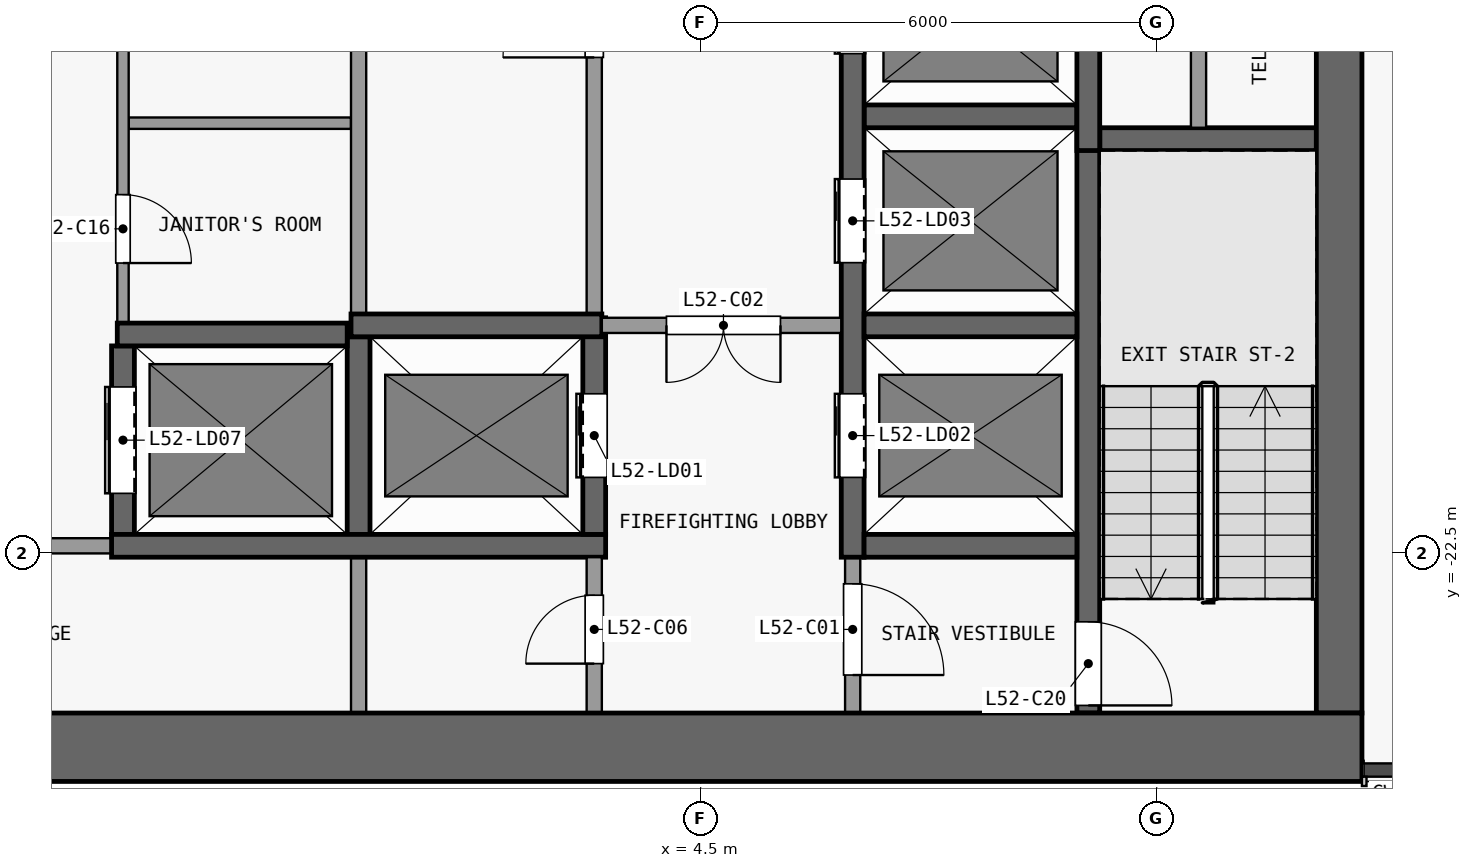
"""IFC4 building model, lengths in metres.
Left out: names, types, materials, properties, quantities, classifications, styles, units other than length and angle.
Written with IfcOpenShell. Run it as: python <this file> out.ifc"""

import sys

from ifc_helpers import new_model, si_unit, direction, frame, frame_2d, origin, place, context, subcontext, project, spatial, rectangle, extrude, element, fill, save


model = new_model("IFC4")
c1 = context("Model", 3, precision=1e-05, world=origin(), true_north=direction((0.0, 1.0)))
c2 = subcontext(c1, "Body", "Model", "MODEL_VIEW")
j1 = project(units=[si_unit("LENGTHUNIT", "METRE"), si_unit("PLANEANGLEUNIT", "RADIAN")], contexts=[c1])
p1 = place(None, origin())
s1 = spatial("IfcSite", under=j1, at=p1, CompositionType="ELEMENT")
p2 = place(p1, origin())
s2 = spatial("IfcBuilding", under=s1, at=p2, CompositionType="ELEMENT")
p3 = place(p2, frame((0.0, 0.0, 208.7)))
s3 = spatial("IfcBuildingStorey", under=s2, at=p3, CompositionType="ELEMENT", Elevation=208.7)
p4 = place(p3, frame((-13.2, -25.05, 0.0), z_axis=(0.0, 0.0, 1.0), x_axis=(1.0, 0.0, 0.0)))
e1 = element("IfcWall", 1, at=p4, inside=s3, PredefinedType="SHEAR", context=c2, shape_type="SweptSolid", body=[
    extrude(rectangle(XDim=26.4, YDim=0.9, at=frame_2d((13.2, 0.0))), origin(), (0.0, 0.0, 1.0), 3.3),
])
p5 = place(p3, frame((12.9, -24.6, 0.0), z_axis=(0.0, 0.0, 1.0), x_axis=(0.0, 1.0, 0.0)))
e2 = element("IfcWall", 2, at=p5, inside=s3, PredefinedType="SHEAR", context=c2, shape_type="SweptSolid", body=[
    extrude(rectangle(XDim=16.1, YDim=0.6, at=frame_2d((8.05, 0.0))), origin(), (0.0, 0.0, 1.0), 3.3),
])
p6 = place(p3, frame((-3.25, -22.4, 0.0), z_axis=(0.0, 0.0, 1.0), x_axis=(-1.0, 0.0, 0.0)))
e3 = element("IfcWall", 3, at=p6, inside=s3, PredefinedType="PARTITIONING", context=c2, shape_type="SweptSolid", body=[
    extrude(rectangle(XDim=3.15, YDim=0.2, at=frame_2d((1.575, 0.0))), origin(), (0.0, 0.0, 1.0), 3.3),
])
p7 = place(p6, frame((0.8, 0.0, 0.0)))
e4 = element("IfcOpeningElement", 4, at=p7, cuts=e3, PredefinedType="OPENING", context=c2, shape_type="SweptSolid", body=[
    extrude(rectangle(XDim=1.5, YDim=2.1, at=frame_2d((0.75, 1.05))), frame((0.0, 0.11, 0.0), z_axis=(0.0, -1.0, 0.0), x_axis=(1.0, 0.0, 0.0)), (0.0, 0.0, 1.0), 0.22),
])
p8 = place(p3, frame((-3.25, -22.4, 0.0), z_axis=(0.0, 0.0, 1.0), x_axis=(1.0, 0.0, 0.0)))
e5 = element("IfcWall", 5, at=p8, inside=s3, PredefinedType="SHEAR", context=c2, shape_type="SweptSolid", body=[
    extrude(rectangle(XDim=6.5, YDim=0.3, at=frame_2d((3.25, 0.0))), origin(), (0.0, 0.0, 1.0), 3.3),
])
p9 = place(p3, frame((6.65, -22.4, 0.0), z_axis=(0.0, 0.0, 1.0), x_axis=(1.0, 0.0, 0.0)))
e6 = element("IfcWall", 6, at=p9, inside=s3, PredefinedType="SHEAR", context=c2, shape_type="SweptSolid", body=[
    extrude(rectangle(XDim=2.8, YDim=0.3, at=frame_2d((1.4, 0.0))), origin(), (0.0, 0.0, 1.0), 3.3),
])
p10 = place(p3, frame((-3.175, -19.62, 0.0), z_axis=(0.0, 0.0, 1.0), x_axis=(1.0, 0.0, 0.0)))
e7 = element("IfcWall", 7, at=p10, inside=s3, PredefinedType="SHEAR", context=c2, shape_type="SweptSolid", body=[
    extrude(rectangle(XDim=3.025, YDim=0.3, at=frame_2d((1.513, 0.0))), origin(), (0.0, 0.0, 1.0), 3.3),
])
p11 = place(p3, frame((-0.1, -19.5, 0.0), z_axis=(0.0, 0.0, 1.0), x_axis=(1.0, 0.0, 0.0)))
e8 = element("IfcWall", 8, at=p11, inside=s3, PredefinedType="SHEAR", context=c2, shape_type="SweptSolid", body=[
    extrude(rectangle(XDim=3.3, YDim=0.3, at=frame_2d((1.65, 0.0))), origin(), (0.0, 0.0, 1.0), 3.3),
])
p12 = place(p3, frame((6.35, -19.5, 0.0), z_axis=(0.0, 0.0, 1.0), x_axis=(-1.0, 0.0, 0.0)))
e9 = element("IfcWall", 9, at=p12, inside=s3, PredefinedType="PARTITIONING", context=c2, shape_type="SweptSolid", body=[
    extrude(rectangle(XDim=3.15, YDim=0.2, at=frame_2d((1.575, 0.0))), origin(), (0.0, 0.0, 1.0), 3.3),
])
p13 = place(p12, frame((0.8, 0.0, 0.0)))
e10 = element("IfcOpeningElement", 10, at=p13, cuts=e9, PredefinedType="OPENING", context=c2, shape_type="SweptSolid", body=[
    extrude(rectangle(XDim=1.5, YDim=2.1, at=frame_2d((0.75, 1.05))), frame((0.0, 0.11, 0.0), z_axis=(0.0, -1.0, 0.0), x_axis=(1.0, 0.0, 0.0)), (0.0, 0.0, 1.0), 0.22),
])
p14 = place(p3, frame((6.65, -19.5, 0.0), z_axis=(0.0, 0.0, 1.0), x_axis=(1.0, 0.0, 0.0)))
e11 = element("IfcWall", 11, at=p14, inside=s3, PredefinedType="SHEAR", context=c2, shape_type="SweptSolid", body=[
    extrude(rectangle(XDim=2.8, YDim=0.3, at=frame_2d((1.4, 0.0))), origin(), (0.0, 0.0, 1.0), 3.3),
])
p15 = place(p3, frame((9.75, -17.05, 0.0), z_axis=(0.0, 0.0, 1.0), x_axis=(1.0, 0.0, 0.0)))
e12 = element("IfcWall", 12, at=p15, inside=s3, PredefinedType="SHEAR", context=c2, shape_type="SweptSolid", body=[
    extrude(rectangle(XDim=2.85, YDim=0.3, at=frame_2d((1.425, 0.0))), origin(), (0.0, 0.0, 1.0), 3.3),
])
p16 = place(p3, frame((-3.025, -16.84, 0.0), z_axis=(0.0, 0.0, 1.0), x_axis=(1.0, 0.0, 0.0)))
e13 = element("IfcWall", 13, at=p16, inside=s3, PredefinedType="PARTITIONING", context=c2, shape_type="SweptSolid", body=[
    extrude(rectangle(XDim=2.925, YDim=0.15, at=frame_2d((1.462, 0.0))), origin(), (0.0, 0.0, 1.0), 3.3),
])
p17 = place(p3, frame((6.65, -16.75, 0.0), z_axis=(0.0, 0.0, 1.0), x_axis=(1.0, 0.0, 0.0)))
e14 = element("IfcWall", 14, at=p17, inside=s3, PredefinedType="SHEAR", context=c2, shape_type="SweptSolid", body=[
    extrude(rectangle(XDim=2.8, YDim=0.3, at=frame_2d((1.4, 0.0))), origin(), (0.0, 0.0, 1.0), 3.3),
])
p18 = place(p3, frame((-3.1, -22.25, 0.0), z_axis=(0.0, 0.0, 1.0), x_axis=(0.0, 1.0, 0.0)))
e15 = element("IfcWall", 15, at=p18, inside=s3, PredefinedType="SHEAR", context=c2, shape_type="SweptSolid", body=[
    extrude(rectangle(XDim=2.48, YDim=0.3, at=frame_2d((1.24, 0.0))), origin(), (0.0, 0.0, 1.0), 3.3),
])
p19 = place(p18, frame((0.54, 0.0, 0.0)))
e16 = element("IfcOpeningElement", 16, at=p19, cuts=e15, PredefinedType="OPENING", context=c2, shape_type="SweptSolid", body=[
    extrude(rectangle(XDim=1.4, YDim=2.1, at=frame_2d((0.7, 1.05))), frame((0.0, 0.16, 0.0), z_axis=(0.0, -1.0, 0.0), x_axis=(1.0, 0.0, 0.0)), (0.0, 0.0, 1.0), 0.32),
])
p20 = place(p3, frame((-3.1, -8.5, 0.0), z_axis=(0.0, 0.0, 1.0), x_axis=(0.0, -1.0, 0.0)))
e17 = element("IfcWall", 17, at=p20, inside=s3, PredefinedType="PARTITIONING", context=c2, shape_type="SweptSolid", body=[
    extrude(rectangle(XDim=10.97, YDim=0.15, at=frame_2d((5.485, 0.0))), origin(), (0.0, 0.0, 1.0), 3.3),
])
p21 = place(p20, frame((9.28, 0.0, 0.0)))
e18 = element("IfcOpeningElement", 18, at=p21, cuts=e17, PredefinedType="OPENING", context=c2, shape_type="SweptSolid", body=[
    extrude(rectangle(XDim=0.9, YDim=2.1, at=frame_2d((0.45, 1.05))), frame((0.0, 0.085, 0.0), z_axis=(0.0, -1.0, 0.0), x_axis=(1.0, 0.0, 0.0)), (0.0, 0.0, 1.0), 0.17),
])
p22 = place(p20, frame((3.57, 0.0, 0.0)))
e19 = element("IfcOpeningElement", 19, at=p22, cuts=e17, PredefinedType="OPENING", context=c2, shape_type="SweptSolid", body=[
    extrude(rectangle(XDim=1.2, YDim=2.1, at=frame_2d((0.6, 1.05))), frame((0.0, 0.085, 0.0), z_axis=(0.0, -1.0, 0.0), x_axis=(1.0, 0.0, 0.0)), (0.0, 0.0, 1.0), 0.17),
])
p23 = place(p3, frame((0.0, -24.6, 0.0), z_axis=(0.0, 0.0, 1.0), x_axis=(0.0, 1.0, 0.0)))
e20 = element("IfcWall", 20, at=p23, inside=s3, PredefinedType="PARTITIONING", context=c2, shape_type="SweptSolid", body=[
    extrude(rectangle(XDim=2.05, YDim=0.2, at=frame_2d((1.025, 0.0))), origin(), (0.0, 0.0, 1.0), 3.3),
])
p24 = place(p3, frame((0.0, -22.25, 0.0), z_axis=(0.0, 0.0, 1.0), x_axis=(0.0, 1.0, 0.0)))
e21 = element("IfcWall", 21, at=p24, inside=s3, PredefinedType="SHEAR", context=c2, shape_type="SweptSolid", body=[
    extrude(rectangle(XDim=2.6, YDim=0.3, at=frame_2d((1.3, 0.0))), origin(), (0.0, 0.0, 1.0), 3.3),
])
p25 = place(p3, frame((0.0, -19.35, 0.0), z_axis=(0.0, 0.0, 1.0), x_axis=(0.0, 1.0, 0.0)))
e22 = element("IfcWall", 22, at=p25, inside=s3, PredefinedType="PARTITIONING", context=c2, shape_type="SweptSolid", body=[
    extrude(rectangle(XDim=8.2, YDim=0.2, at=frame_2d((4.1, 0.0))), origin(), (0.0, 0.0, 1.0), 3.3),
])
p26 = place(p3, frame((3.1, -24.6, 0.0), z_axis=(0.0, 0.0, 1.0), x_axis=(0.0, 1.0, 0.0)))
e23 = element("IfcWall", 23, at=p26, inside=s3, PredefinedType="PARTITIONING", context=c2, shape_type="SweptSolid", body=[
    extrude(rectangle(XDim=2.05, YDim=0.2, at=frame_2d((1.025, 0.0))), origin(), (0.0, 0.0, 1.0), 3.3),
])
p27 = place(p26, frame((0.65, 0.0, 0.0)))
e24 = element("IfcOpeningElement", 24, at=p27, cuts=e23, PredefinedType="OPENING", context=c2, shape_type="SweptSolid", body=[
    extrude(rectangle(XDim=0.9, YDim=2.1, at=frame_2d((0.45, 1.05))), frame((0.0, 0.11, 0.0), z_axis=(0.0, -1.0, 0.0), x_axis=(1.0, 0.0, 0.0)), (0.0, 0.0, 1.0), 0.22),
])
p28 = place(p3, frame((3.1, -22.25, 0.0), z_axis=(0.0, 0.0, 1.0), x_axis=(0.0, 1.0, 0.0)))
e25 = element("IfcWall", 25, at=p28, inside=s3, PredefinedType="SHEAR", context=c2, shape_type="SweptSolid", body=[
    extrude(rectangle(XDim=2.85, YDim=0.3, at=frame_2d((1.425, 0.0))), origin(), (0.0, 0.0, 1.0), 3.3),
])
p29 = place(p28, frame((0.75, 0.0, 0.0)))
e26 = element("IfcOpeningElement", 26, at=p29, cuts=e25, PredefinedType="OPENING", context=c2, shape_type="SweptSolid", body=[
    extrude(rectangle(XDim=1.1, YDim=2.1, at=frame_2d((0.55, 1.05))), frame((0.0, 0.16, 0.0), z_axis=(0.0, -1.0, 0.0), x_axis=(1.0, 0.0, 0.0)), (0.0, 0.0, 1.0), 0.32),
])
p30 = place(p3, frame((3.1, -19.6, 0.0), z_axis=(0.0, 0.0, 1.0), x_axis=(0.0, 1.0, 0.0)))
e27 = element("IfcWall", 27, at=p30, inside=s3, PredefinedType="PARTITIONING", context=c2, shape_type="SweptSolid", body=[
    extrude(rectangle(XDim=8.45, YDim=0.2, at=frame_2d((4.225, 0.0))), origin(), (0.0, 0.0, 1.0), 3.3),
])
p31 = place(p30, frame((3.625, 0.0, 0.0)))
e28 = element("IfcOpeningElement", 28, at=p31, cuts=e27, PredefinedType="OPENING", context=c2, shape_type="SweptSolid", body=[
    extrude(rectangle(XDim=1.2, YDim=2.1, at=frame_2d((0.6, 1.05))), frame((0.0, 0.11, 0.0), z_axis=(0.0, -1.0, 0.0), x_axis=(1.0, 0.0, 0.0)), (0.0, 0.0, 1.0), 0.22),
])
p32 = place(p3, frame((6.5, -22.55, 0.0), z_axis=(0.0, 0.0, 1.0), x_axis=(0.0, -1.0, 0.0)))
e29 = element("IfcWall", 29, at=p32, inside=s3, PredefinedType="PARTITIONING", context=c2, shape_type="SweptSolid", body=[
    extrude(rectangle(XDim=2.05, YDim=0.2, at=frame_2d((1.025, 0.0))), origin(), (0.0, 0.0, 1.0), 3.3),
])
p33 = place(p32, frame((0.35, 0.0, 0.0)))
e30 = element("IfcOpeningElement", 30, at=p33, cuts=e29, PredefinedType="OPENING", context=c2, shape_type="SweptSolid", body=[
    extrude(rectangle(XDim=1.2, YDim=2.1, at=frame_2d((0.6, 1.05))), frame((0.0, 0.11, 0.0), z_axis=(0.0, -1.0, 0.0), x_axis=(1.0, 0.0, 0.0)), (0.0, 0.0, 1.0), 0.22),
])
p34 = place(p3, frame((6.5, -22.55, 0.0), z_axis=(0.0, 0.0, 1.0), x_axis=(0.0, 1.0, 0.0)))
e31 = element("IfcWall", 31, at=p34, inside=s3, PredefinedType="SHEAR", context=c2, shape_type="SweptSolid", body=[
    extrude(rectangle(XDim=14.05, YDim=0.3, at=frame_2d((7.025, 0.0))), origin(), (0.0, 0.0, 1.0), 3.3),
])
p35 = place(p34, frame((1.05, 0.0, 0.0)))
e32 = element("IfcOpeningElement", 32, at=p35, cuts=e31, PredefinedType="OPENING", context=c2, shape_type="SweptSolid", body=[
    extrude(rectangle(XDim=1.1, YDim=2.1, at=frame_2d((0.55, 1.05))), frame((0.0, 0.16, 0.0), z_axis=(0.0, -1.0, 0.0), x_axis=(1.0, 0.0, 0.0)), (0.0, 0.0, 1.0), 0.32),
])
p36 = place(p34, frame((3.875, 0.0, 0.0)))
e33 = element("IfcOpeningElement", 33, at=p36, cuts=e31, PredefinedType="OPENING", context=c2, shape_type="SweptSolid", body=[
    extrude(rectangle(XDim=1.1, YDim=2.1, at=frame_2d((0.55, 1.05))), frame((0.0, 0.16, 0.0), z_axis=(0.0, -1.0, 0.0), x_axis=(1.0, 0.0, 0.0)), (0.0, 0.0, 1.0), 0.32),
])
p37 = place(p34, frame((6.625, 0.0, 0.0)))
e34 = element("IfcOpeningElement", 34, at=p37, cuts=e31, PredefinedType="OPENING", context=c2, shape_type="SweptSolid", body=[
    extrude(rectangle(XDim=1.1, YDim=2.1, at=frame_2d((0.55, 1.05))), frame((0.0, 0.16, 0.0), z_axis=(0.0, -1.0, 0.0), x_axis=(1.0, 0.0, 0.0)), (0.0, 0.0, 1.0), 0.32),
])
p38 = place(p34, frame((9.375, 0.0, 0.0)))
e35 = element("IfcOpeningElement", 35, at=p38, cuts=e31, PredefinedType="OPENING", context=c2, shape_type="SweptSolid", body=[
    extrude(rectangle(XDim=1.1, YDim=2.1, at=frame_2d((0.55, 1.05))), frame((0.0, 0.16, 0.0), z_axis=(0.0, -1.0, 0.0), x_axis=(1.0, 0.0, 0.0)), (0.0, 0.0, 1.0), 0.32),
])
p39 = place(p34, frame((12.125, 0.0, 0.0)))
e36 = element("IfcOpeningElement", 36, at=p39, cuts=e31, PredefinedType="OPENING", context=c2, shape_type="SweptSolid", body=[
    extrude(rectangle(XDim=1.1, YDim=2.1, at=frame_2d((0.55, 1.05))), frame((0.0, 0.16, 0.0), z_axis=(0.0, -1.0, 0.0), x_axis=(1.0, 0.0, 0.0)), (0.0, 0.0, 1.0), 0.32),
])
p40 = place(p3, frame((9.6, -16.9, 0.0), z_axis=(0.0, 0.0, 1.0), x_axis=(0.0, -1.0, 0.0)))
e37 = element("IfcWall", 37, at=p40, inside=s3, PredefinedType="SHEAR", context=c2, shape_type="SweptSolid", body=[
    extrude(rectangle(XDim=7.7, YDim=0.3, at=frame_2d((3.85, 0.0))), origin(), (0.0, 0.0, 1.0), 3.3),
])
p41 = place(p40, frame((6.5, 0.0, 0.0)))
e38 = element("IfcOpeningElement", 38, at=p41, cuts=e37, PredefinedType="OPENING", context=c2, shape_type="SweptSolid", body=[
    extrude(rectangle(XDim=1.1, YDim=2.1, at=frame_2d((0.55, 1.05))), frame((0.0, 0.16, 0.0), z_axis=(0.0, -1.0, 0.0), x_axis=(1.0, 0.0, 0.0)), (0.0, 0.0, 1.0), 0.32),
])
p42 = place(p3, frame((9.6, -17.2, 0.0), z_axis=(0.0, 0.0, 1.0), x_axis=(0.0, 1.0, 0.0)))
e39 = element("IfcWall", 39, at=p42, inside=s3, PredefinedType="SHEAR", context=c2, shape_type="SweptSolid", body=[
    extrude(rectangle(XDim=8.7, YDim=0.3, at=frame_2d((4.35, 0.0))), origin(), (0.0, 0.0, 1.0), 3.3),
])
p43 = place(p3, frame((11.05, -11.9, 0.0), z_axis=(0.0, 0.0, 1.0), x_axis=(0.0, -1.0, 0.0)))
e40 = element("IfcWall", 40, at=p43, inside=s3, PredefinedType="PARTITIONING", context=c2, shape_type="SweptSolid", body=[
    extrude(rectangle(XDim=5.0, YDim=0.2, at=frame_2d((2.5, 0.0))), origin(), (0.0, 0.0, 1.0), 3.3),
])
p44 = place(p43, frame((2.175, 0.0, 0.0)))
e41 = element("IfcOpeningElement", 41, at=p44, cuts=e40, PredefinedType="OPENING", context=c2, shape_type="SweptSolid", body=[
    extrude(rectangle(XDim=0.9, YDim=2.1, at=frame_2d((0.45, 1.05))), frame((0.0, 0.11, 0.0), z_axis=(0.0, -1.0, 0.0), x_axis=(1.0, 0.0, 0.0)), (0.0, 0.0, 1.0), 0.22),
])
p45 = place(p29, origin())
e42 = element("IfcDoor", 42, at=p45, inside=s3, OperationType="DOUBLE_DOOR_SLIDING", PredefinedType="DOOR", context=c2, shape_type="SweptSolid", body=[
    extrude(rectangle(XDim=1.1, YDim=2.1, at=frame_2d((0.55, 1.05))), frame((0.0, 0.025, 0.0), z_axis=(0.0, -1.0, 0.0), x_axis=(1.0, 0.0, 0.0)), (0.0, 0.0, 1.0), 0.05),
])
fill(e26, e42)
p46 = place(p35, origin())
e43 = element("IfcDoor", 43, at=p46, inside=s3, OperationType="DOUBLE_DOOR_SLIDING", PredefinedType="DOOR", context=c2, shape_type="SweptSolid", body=[
    extrude(rectangle(XDim=1.1, YDim=2.1, at=frame_2d((0.55, 1.05))), frame((0.0, 0.025, 0.0), z_axis=(0.0, -1.0, 0.0), x_axis=(1.0, 0.0, 0.0)), (0.0, 0.0, 1.0), 0.05),
])
fill(e32, e43)
p47 = place(p36, origin())
e44 = element("IfcDoor", 44, at=p47, inside=s3, OperationType="DOUBLE_DOOR_SLIDING", PredefinedType="DOOR", context=c2, shape_type="SweptSolid", body=[
    extrude(rectangle(XDim=1.1, YDim=2.1, at=frame_2d((0.55, 1.05))), frame((0.0, 0.025, 0.0), z_axis=(0.0, -1.0, 0.0), x_axis=(1.0, 0.0, 0.0)), (0.0, 0.0, 1.0), 0.05),
])
fill(e33, e44)
p48 = place(p37, origin())
e45 = element("IfcDoor", 45, at=p48, inside=s3, OperationType="DOUBLE_DOOR_SLIDING", PredefinedType="DOOR", context=c2, shape_type="SweptSolid", body=[
    extrude(rectangle(XDim=1.1, YDim=2.1, at=frame_2d((0.55, 1.05))), frame((0.0, 0.025, 0.0), z_axis=(0.0, -1.0, 0.0), x_axis=(1.0, 0.0, 0.0)), (0.0, 0.0, 1.0), 0.05),
])
fill(e34, e45)
p49 = place(p19, origin())
e46 = element("IfcDoor", 46, at=p49, inside=s3, OperationType="DOUBLE_DOOR_SLIDING", PredefinedType="DOOR", context=c2, shape_type="SweptSolid", body=[
    extrude(rectangle(XDim=1.4, YDim=2.1, at=frame_2d((0.7, 1.05))), frame((0.0, 0.025, 0.0), z_axis=(0.0, -1.0, 0.0), x_axis=(1.0, 0.0, 0.0)), (0.0, 0.0, 1.0), 0.05),
])
fill(e16, e46)
p50 = place(p33, origin())
e47 = element("IfcDoor", 47, at=p50, inside=s3, OperationType="SINGLE_SWING_RIGHT", PredefinedType="DOOR", context=c2, shape_type="SweptSolid", body=[
    extrude(rectangle(XDim=1.2, YDim=2.1, at=frame_2d((0.6, 1.05))), frame((0.0, 0.025, 0.0), z_axis=(0.0, -1.0, 0.0), x_axis=(1.0, 0.0, 0.0)), (0.0, 0.0, 1.0), 0.05),
])
fill(e30, e47)
p51 = place(p13, origin())
e48 = element("IfcDoor", 48, at=p51, inside=s3, OperationType="DOUBLE_DOOR_SINGLE_SWING", PredefinedType="DOOR", context=c2, shape_type="SweptSolid", body=[
    extrude(rectangle(XDim=1.5, YDim=2.1, at=frame_2d((0.75, 1.05))), frame((0.0, 0.025, 0.0), z_axis=(0.0, -1.0, 0.0), x_axis=(1.0, 0.0, 0.0)), (0.0, 0.0, 1.0), 0.05),
])
fill(e10, e48)
p52 = place(p27, origin())
e49 = element("IfcDoor", 49, at=p52, inside=s3, OperationType="SINGLE_SWING_LEFT", PredefinedType="DOOR", context=c2, shape_type="SweptSolid", body=[
    extrude(rectangle(XDim=0.9, YDim=2.1, at=frame_2d((0.45, 1.05))), frame((0.0, 0.025, 0.0), z_axis=(0.0, -1.0, 0.0), x_axis=(1.0, 0.0, 0.0)), (0.0, 0.0, 1.0), 0.05),
])
fill(e24, e49)
p53 = place(p31, origin())
e50 = element("IfcDoor", 50, at=p53, inside=s3, OperationType="SINGLE_SWING_LEFT", PredefinedType="DOOR", context=c2, shape_type="SweptSolid", body=[
    extrude(rectangle(XDim=1.2, YDim=2.1, at=frame_2d((0.6, 1.05))), frame((0.0, 0.025, 0.0), z_axis=(0.0, -1.0, 0.0), x_axis=(1.0, 0.0, 0.0)), (0.0, 0.0, 1.0), 0.05),
])
fill(e28, e50)
p54 = place(p21, origin())
e51 = element("IfcDoor", 51, at=p54, inside=s3, OperationType="SINGLE_SWING_RIGHT", PredefinedType="DOOR", context=c2, shape_type="SweptSolid", body=[
    extrude(rectangle(XDim=0.9, YDim=2.1, at=frame_2d((0.45, 1.05))), frame((0.0, 0.025, 0.0), z_axis=(0.0, -1.0, 0.0), x_axis=(1.0, 0.0, 0.0)), (0.0, 0.0, 1.0), 0.05),
])
fill(e18, e51)
p55 = place(p41, origin())
e52 = element("IfcDoor", 52, at=p55, inside=s3, OperationType="SINGLE_SWING_RIGHT", PredefinedType="DOOR", context=c2, shape_type="SweptSolid", body=[
    extrude(rectangle(XDim=1.1, YDim=2.1, at=frame_2d((0.55, 1.05))), frame((0.0, 0.025, 0.0), z_axis=(0.0, -1.0, 0.0), x_axis=(1.0, 0.0, 0.0)), (0.0, 0.0, 1.0), 0.05),
])
fill(e38, e52)
save(model, sys.argv[1])
